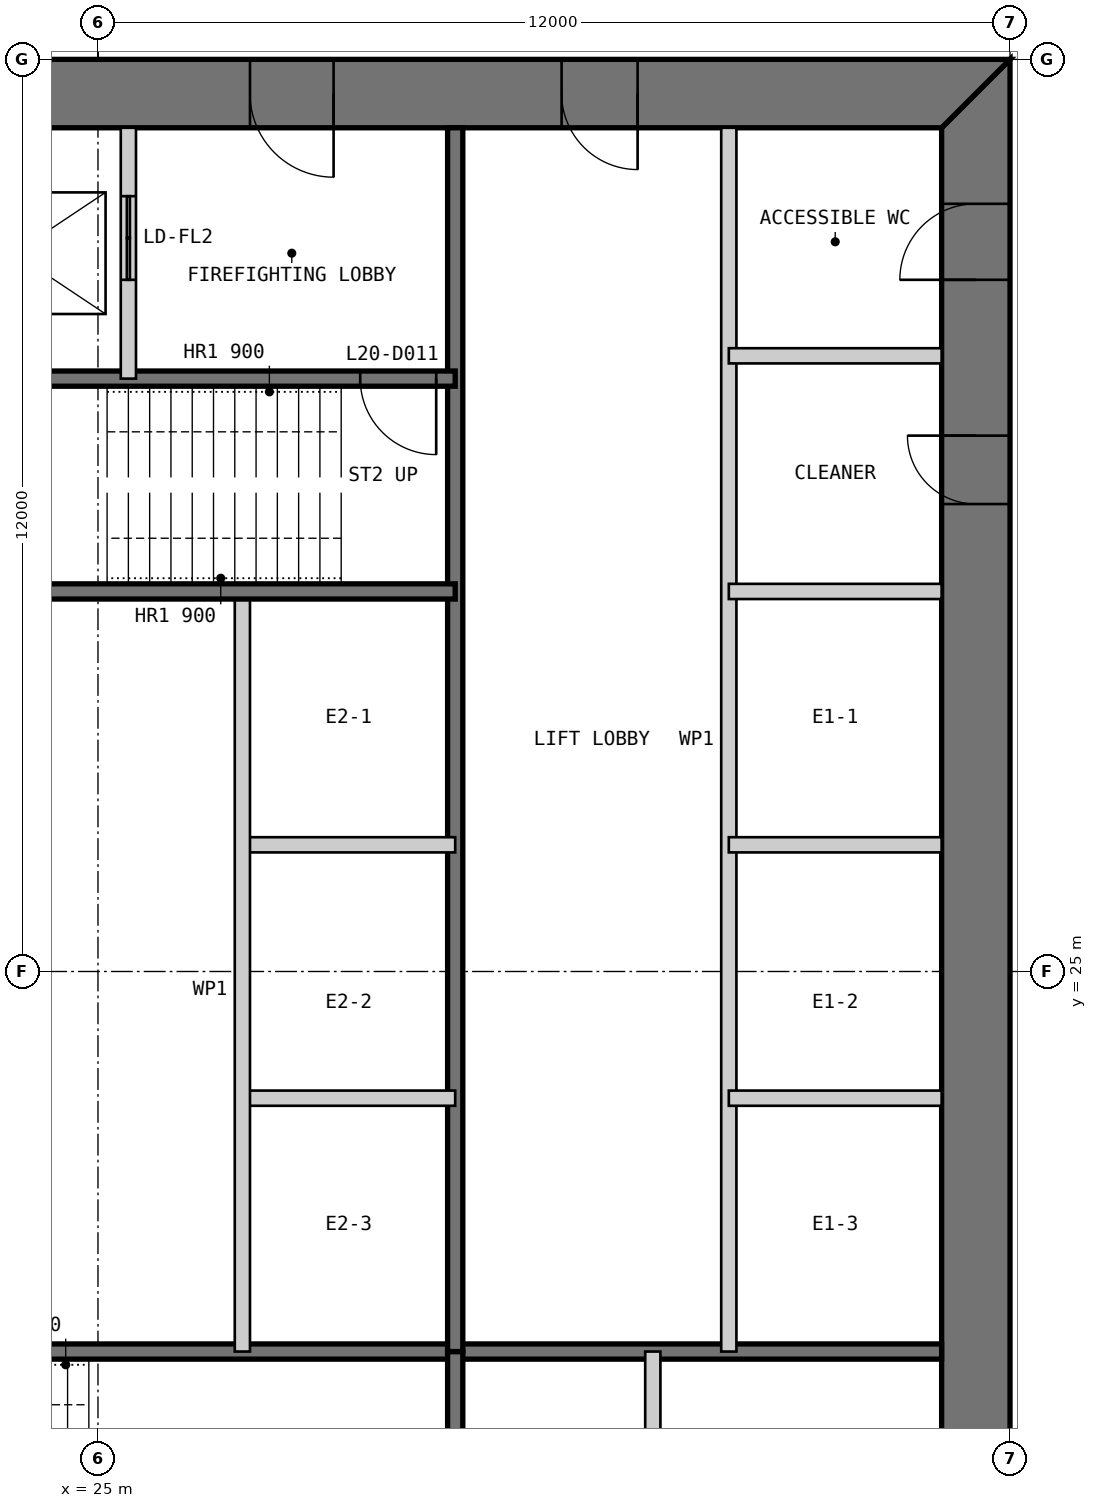
"""IFC4 building model, lengths in metres.
Left out: names, types, materials, properties, quantities, classifications, styles, units other than length and angle.
Written with IfcOpenShell. Run it as: python <this file> out.ifc"""

import sys

from ifc_helpers import new_model, si_unit, direction, frame, frame_2d, origin, place, context, subcontext, project, spatial, polyline, rectangle, outline, extrude, element, fill, save


model = new_model("IFC4")
c1 = context("Model", 3, precision=1e-05, world=origin(), true_north=direction((0.0, 1.0)))
c2 = subcontext(c1, "Body", "Model", "MODEL_VIEW")
j1 = project(units=[si_unit("LENGTHUNIT", "METRE"), si_unit("PLANEANGLEUNIT", "RADIAN")], contexts=[c1])
p1 = place(None, origin())
s1 = spatial("IfcSite", under=j1, at=p1, CompositionType="ELEMENT")
p2 = place(p1, origin())
s2 = spatial("IfcBuilding", under=s1, at=p2, CompositionType="ELEMENT")
p3 = place(p2, frame((0.0, 0.0, 87.0)))
s3 = spatial("IfcBuildingStorey", under=s2, at=p3, CompositionType="ELEMENT", Elevation=87.0)
p4 = place(p3, frame((36.55, 13.9, 0.0), z_axis=(0.0, 0.0, 1.0), x_axis=(0.0, 1.0, 0.0)))
e1 = element("IfcWall", 1, at=p4, inside=s3, PredefinedType="SHEAR", context=c2, shape_type="SweptSolid", body=[
    extrude(outline(polyline([(-0.9, -0.45), (23.1, -0.45), (22.2, 0.45), (0.0, 0.45), (-0.9, -0.45)])), origin(), (0.0, 0.0, 1.0), 4.0),
])
p5 = place(p4, frame((20.2, 0.0, 0.0)))
e2 = element("IfcOpeningElement", 2, at=p5, cuts=e1, PredefinedType="OPENING", context=c2, shape_type="SweptSolid", body=[
    extrude(rectangle(XDim=1.0, YDim=2.2, at=frame_2d((0.5, 1.1))), frame((0.0, 0.46, 0.0), z_axis=(0.0, -1.0, 0.0), x_axis=(1.0, 0.0, 0.0)), (0.0, 0.0, 1.0), 0.92),
])
p6 = place(p4, frame((17.25, 0.0, 0.0)))
e3 = element("IfcOpeningElement", 3, at=p6, cuts=e1, PredefinedType="OPENING", context=c2, shape_type="SweptSolid", body=[
    extrude(rectangle(XDim=0.9, YDim=2.2, at=frame_2d((0.45, 1.1))), frame((0.0, 0.46, 0.0), z_axis=(0.0, -1.0, 0.0), x_axis=(1.0, 0.0, 0.0)), (0.0, 0.0, 1.0), 0.92),
])
p7 = place(p3, frame((37.0, 36.55, 0.0), z_axis=(0.0, 0.0, 1.0), x_axis=(-1.0, 0.0, 0.0)))
e4 = element("IfcWall", 4, at=p7, inside=s3, PredefinedType="SHEAR", context=c2, shape_type="SweptSolid", body=[
    extrude(outline(polyline([(0.0, -0.45), (24.0, -0.45), (23.1, 0.45), (0.9, 0.45), (0.0, -0.45)])), origin(), (0.0, 0.0, 1.0), 4.0),
])
p8 = place(p7, frame((4.9, 0.0, 0.0)))
e5 = element("IfcOpeningElement", 5, at=p8, cuts=e4, PredefinedType="OPENING", context=c2, shape_type="SweptSolid", body=[
    extrude(rectangle(XDim=1.0, YDim=2.2, at=frame_2d((0.5, 1.1))), frame((0.0, 0.46, 0.0), z_axis=(0.0, -1.0, 0.0), x_axis=(1.0, 0.0, 0.0)), (0.0, 0.0, 1.0), 0.92),
])
p9 = place(p7, frame((8.9, 0.0, 0.0)))
e6 = element("IfcOpeningElement", 6, at=p9, cuts=e4, PredefinedType="OPENING", context=c2, shape_type="SweptSolid", body=[
    extrude(rectangle(XDim=1.1, YDim=2.2, at=frame_2d((0.55, 1.1))), frame((0.0, 0.46, 0.0), z_axis=(0.0, -1.0, 0.0), x_axis=(1.0, 0.0, 0.0)), (0.0, 0.0, 1.0), 0.92),
])
p10 = place(p7, frame((15.05, 0.0, 0.0)))
e7 = element("IfcOpeningElement", 7, at=p10, cuts=e4, PredefinedType="OPENING", context=c2, shape_type="SweptSolid", body=[
    extrude(rectangle(XDim=0.9, YDim=2.2, at=frame_2d((0.45, 1.1))), frame((0.0, 0.46, 0.0), z_axis=(0.0, -1.0, 0.0), x_axis=(1.0, 0.0, 0.0)), (0.0, 0.0, 1.0), 0.92),
])
p11 = place(p7, frame((17.9, 0.0, 0.0)))
e8 = element("IfcOpeningElement", 8, at=p11, cuts=e4, PredefinedType="OPENING", context=c2, shape_type="SweptSolid", body=[
    extrude(rectangle(XDim=1.0, YDim=2.2, at=frame_2d((0.5, 1.1))), frame((0.0, 0.46, 0.0), z_axis=(0.0, -1.0, 0.0), x_axis=(1.0, 0.0, 0.0)), (0.0, 0.0, 1.0), 0.92),
])
p12 = place(p7, frame((21.4, 0.0, 0.0)))
e9 = element("IfcOpeningElement", 9, at=p12, cuts=e4, PredefinedType="OPENING", context=c2, shape_type="SweptSolid", body=[
    extrude(rectangle(XDim=1.0, YDim=2.2, at=frame_2d((0.5, 1.1))), frame((0.0, 0.46, 0.0), z_axis=(0.0, -1.0, 0.0), x_axis=(1.0, 0.0, 0.0)), (0.0, 0.0, 1.0), 0.92),
])
p13 = place(p3, frame((20.3, 20.0, 0.0), z_axis=(0.0, 0.0, 1.0), x_axis=(1.0, 0.0, 0.0)))
e10 = element("IfcWall", 10, at=p13, inside=s3, PredefinedType="SOLIDWALL", context=c2, shape_type="SweptSolid", body=[
    extrude(rectangle(XDim=15.8, YDim=0.2, at=frame_2d((7.9, 0.0))), origin(), (0.0, 0.0, 1.0), 3.8),
])
p14 = place(p3, frame((29.7, 13.9, 0.0), z_axis=(0.0, 0.0, 1.0), x_axis=(0.0, 1.0, 0.0)))
e11 = element("IfcWall", 11, at=p14, inside=s3, PredefinedType="SOLIDWALL", context=c2, shape_type="SweptSolid", body=[
    extrude(rectangle(XDim=6.1, YDim=0.2, at=frame_2d((3.05, 0.0))), origin(), (0.0, 0.0, 1.0), 3.8),
])
p15 = place(p3, frame((32.3, 13.9, 0.0), z_axis=(0.0, 0.0, 1.0), x_axis=(0.0, 1.0, 0.0)))
e12 = element("IfcWall", 12, at=p15, inside=s3, PredefinedType="PARTITIONING", context=c2, shape_type="SweptSolid", body=[
    extrude(rectangle(XDim=6.1, YDim=0.2, at=frame_2d((3.05, 0.0))), origin(), (0.0, 0.0, 1.0), 3.8),
])
p16 = place(p3, frame((33.3, 36.1, 0.0), z_axis=(0.0, 0.0, 1.0), x_axis=(0.0, -1.0, 0.0)))
e13 = element("IfcWall", 13, at=p16, inside=s3, PredefinedType="PARTITIONING", context=c2, shape_type="SweptSolid", body=[
    extrude(rectangle(XDim=16.1, YDim=0.2, at=frame_2d((8.05, 0.0))), origin(), (0.0, 0.0, 1.0), 3.8),
])
p17 = place(p3, frame((29.7, 36.1, 0.0), z_axis=(0.0, 0.0, 1.0), x_axis=(0.0, -1.0, 0.0)))
e14 = element("IfcWall", 14, at=p17, inside=s3, PredefinedType="SOLIDWALL", context=c2, shape_type="SweptSolid", body=[
    extrude(rectangle(XDim=16.1, YDim=0.2, at=frame_2d((8.05, 0.0))), origin(), (0.0, 0.0, 1.0), 3.8),
])
for number, where, z_axis, x_axis in (
    (15, (36.1, 30.0, 0.0), (0.0, 0.0, 1.0), (-1.0, 0.0, 0.0)),
    (16, (36.1, 26.667, 0.0), (0.0, 0.0, 1.0), (-1.0, 0.0, 0.0)),
    (17, (36.1, 23.333, 0.0), (0.0, 0.0, 1.0), (-1.0, 0.0, 0.0)),
    (18, (29.7, 26.667, 0.0), (0.0, 0.0, 1.0), (-1.0, 0.0, 0.0)),
    (19, (29.7, 23.333, 0.0), (0.0, 0.0, 1.0), (-1.0, 0.0, 0.0)),
):
    element("IfcWall", number, at=place(p3, frame(where, z_axis=z_axis, x_axis=x_axis)), inside=s3, PredefinedType="PARTITIONING", context=c2, shape_type="SweptSolid", body=[
        extrude(rectangle(XDim=2.8, YDim=0.2, at=frame_2d((1.4, 0.0))), origin(), (0.0, 0.0, 1.0), 3.8),
    ])
p18 = place(p3, frame((26.9, 30.0, 0.0), z_axis=(0.0, 0.0, 1.0), x_axis=(0.0, -1.0, 0.0)))
e20 = element("IfcWall", 20, at=p18, inside=s3, PredefinedType="PARTITIONING", context=c2, shape_type="SweptSolid", body=[
    extrude(rectangle(XDim=10.0, YDim=0.2, at=frame_2d((5.0, 0.0))), origin(), (0.0, 0.0, 1.0), 3.8),
])
p19 = place(p3, frame((29.7, 32.8, 0.0), z_axis=(0.0, 0.0, 1.0), x_axis=(-1.0, 0.0, 0.0)))
e21 = element("IfcWall", 21, at=p19, inside=s3, PredefinedType="SOLIDWALL", context=c2, shape_type="SweptSolid", body=[
    extrude(rectangle(XDim=9.4, YDim=0.2, at=frame_2d((4.7, 0.0))), origin(), (0.0, 0.0, 1.0), 3.8),
])
p20 = place(p19, frame((0.25, 0.0, 0.0)))
e22 = element("IfcOpeningElement", 22, at=p20, cuts=e21, PredefinedType="OPENING", context=c2, shape_type="SweptSolid", body=[
    extrude(rectangle(XDim=1.0, YDim=2.2, at=frame_2d((0.5, 1.1))), frame((0.0, 0.11, 0.0), z_axis=(0.0, -1.0, 0.0), x_axis=(1.0, 0.0, 0.0)), (0.0, 0.0, 1.0), 0.22),
])
p21 = place(p3, frame((29.7, 30.0, 0.0), z_axis=(0.0, 0.0, 1.0), x_axis=(-1.0, 0.0, 0.0)))
e23 = element("IfcWall", 23, at=p21, inside=s3, PredefinedType="SOLIDWALL", context=c2, shape_type="SweptSolid", body=[
    extrude(rectangle(XDim=15.8, YDim=0.2, at=frame_2d((7.9, 0.0))), origin(), (0.0, 0.0, 1.0), 3.8),
])
p22 = place(p3, frame((25.4, 36.1, 0.0), z_axis=(0.0, 0.0, 1.0), x_axis=(0.0, -1.0, 0.0)))
e24 = element("IfcWall", 24, at=p22, inside=s3, PredefinedType="PARTITIONING", context=c2, shape_type="SweptSolid", body=[
    extrude(rectangle(XDim=3.3, YDim=0.2, at=frame_2d((1.65, 0.0))), origin(), (0.0, 0.0, 1.0), 3.8),
])
p23 = place(p22, frame((0.9, 0.0, 0.0)))
e25 = element("IfcOpeningElement", 25, at=p23, cuts=e24, PredefinedType="OPENING", context=c2, shape_type="SweptSolid", body=[
    extrude(rectangle(XDim=1.1, YDim=2.2, at=frame_2d((0.55, 1.1))), frame((0.0, 0.11, 0.0), z_axis=(0.0, -1.0, 0.0), x_axis=(1.0, 0.0, 0.0)), (0.0, 0.0, 1.0), 0.22),
])
p24 = place(p3, frame((36.1, 33.1, 0.0), z_axis=(0.0, 0.0, 1.0), x_axis=(-1.0, 0.0, 0.0)))
e26 = element("IfcWall", 26, at=p24, inside=s3, PredefinedType="PARTITIONING", context=c2, shape_type="SweptSolid", body=[
    extrude(rectangle(XDim=2.8, YDim=0.2, at=frame_2d((1.4, 0.0))), origin(), (0.0, 0.0, 1.0), 3.8),
])
p25 = place(p8, origin())
e27 = element("IfcDoor", 27, at=p25, inside=s3, OperationType="SINGLE_SWING_LEFT", PredefinedType="DOOR", context=c2, shape_type="SweptSolid", body=[
    extrude(rectangle(XDim=1.0, YDim=2.2, at=frame_2d((0.5, 1.1))), frame((0.0, 0.025, 0.0), z_axis=(0.0, -1.0, 0.0), x_axis=(1.0, 0.0, 0.0)), (0.0, 0.0, 1.0), 0.05),
    extrude(outline(polyline([(0.0, 0.0), (0.04, 0.0), (0.04, 2.16), (0.96, 2.16), (0.96, 0.0), (1.0, 0.0), (1.0, 2.2), (0.0, 2.2), (0.0, 0.0)])), frame((0.0, 0.3, 0.0), z_axis=(0.0, -1.0, 0.0), x_axis=(1.0, 0.0, 0.0)), (0.0, 0.0, 1.0), 0.6),
])
fill(e5, e27)
p26 = place(p9, origin())
e28 = element("IfcDoor", 28, at=p26, inside=s3, OperationType="SINGLE_SWING_LEFT", PredefinedType="DOOR", context=c2, shape_type="SweptSolid", body=[
    extrude(rectangle(XDim=1.1, YDim=2.2, at=frame_2d((0.55, 1.1))), frame((0.0, 0.025, 0.0), z_axis=(0.0, -1.0, 0.0), x_axis=(1.0, 0.0, 0.0)), (0.0, 0.0, 1.0), 0.05),
    extrude(outline(polyline([(0.0, 0.0), (0.04, 0.0), (0.04, 2.16), (1.06, 2.16), (1.06, 0.0), (1.1, 0.0), (1.1, 2.2), (0.0, 2.2), (0.0, 0.0)])), frame((0.0, 0.3, 0.0), z_axis=(0.0, -1.0, 0.0), x_axis=(1.0, 0.0, 0.0)), (0.0, 0.0, 1.0), 0.6),
])
fill(e6, e28)
p27 = place(p20, origin())
e29 = element("IfcDoor", 29, at=p27, inside=s3, OperationType="SINGLE_SWING_LEFT", PredefinedType="DOOR", context=c2, shape_type="SweptSolid", body=[
    extrude(rectangle(XDim=1.0, YDim=2.2, at=frame_2d((0.5, 1.1))), frame((0.0, 0.025, 0.0), z_axis=(0.0, -1.0, 0.0), x_axis=(1.0, 0.0, 0.0)), (0.0, 0.0, 1.0), 0.05),
])
fill(e22, e29)
p28 = place(p5, origin())
e30 = element("IfcDoor", 30, at=p28, inside=s3, OperationType="SINGLE_SWING_LEFT", PredefinedType="DOOR", context=c2, shape_type="SweptSolid", body=[
    extrude(rectangle(XDim=1.0, YDim=2.2, at=frame_2d((0.5, 1.1))), frame((0.0, 0.025, 0.0), z_axis=(0.0, -1.0, 0.0), x_axis=(1.0, 0.0, 0.0)), (0.0, 0.0, 1.0), 0.05),
    extrude(outline(polyline([(0.0, 0.0), (0.04, 0.0), (0.04, 2.16), (0.96, 2.16), (0.96, 0.0), (1.0, 0.0), (1.0, 2.2), (0.0, 2.2), (0.0, 0.0)])), frame((0.0, 0.3, 0.0), z_axis=(0.0, -1.0, 0.0), x_axis=(1.0, 0.0, 0.0)), (0.0, 0.0, 1.0), 0.6),
])
fill(e2, e30)
p29 = place(p6, origin())
e31 = element("IfcDoor", 31, at=p29, inside=s3, OperationType="SINGLE_SWING_RIGHT", PredefinedType="DOOR", context=c2, shape_type="SweptSolid", body=[
    extrude(rectangle(XDim=0.9, YDim=2.2, at=frame_2d((0.45, 1.1))), frame((0.0, 0.025, 0.0), z_axis=(0.0, -1.0, 0.0), x_axis=(1.0, 0.0, 0.0)), (0.0, 0.0, 1.0), 0.05),
    extrude(outline(polyline([(0.0, 0.0), (0.04, 0.0), (0.04, 2.16), (0.86, 2.16), (0.86, 0.0), (0.9, 0.0), (0.9, 2.2), (0.0, 2.2), (0.0, 0.0)])), frame((0.0, 0.3, 0.0), z_axis=(0.0, -1.0, 0.0), x_axis=(1.0, 0.0, 0.0)), (0.0, 0.0, 1.0), 0.6),
])
fill(e3, e31)
p30 = place(p23, origin())
e32 = element("IfcDoor", 32, at=p30, inside=s3, OperationType="DOUBLE_DOOR_SLIDING", PredefinedType="DOOR", context=c2, shape_type="SweptSolid", body=[
    extrude(rectangle(XDim=1.1, YDim=2.2, at=frame_2d((0.55, 1.1))), frame((0.0, 0.025, 0.0), z_axis=(0.0, -1.0, 0.0), x_axis=(1.0, 0.0, 0.0)), (0.0, 0.0, 1.0), 0.05),
])
fill(e25, e32)
save(model, sys.argv[1])
